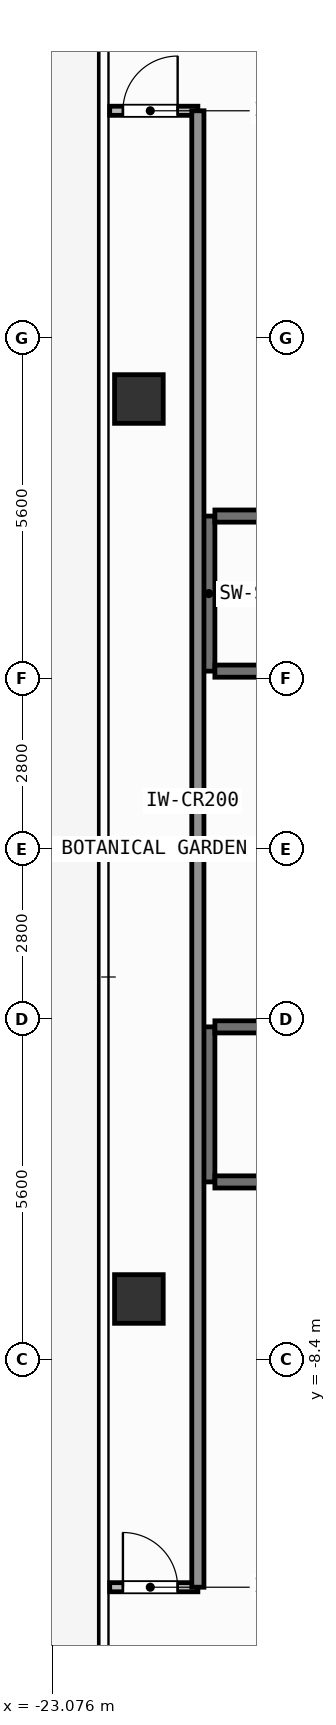
"""IFC4 building model, lengths in metres.
Left out: names, types, materials, properties, quantities, classifications, styles, units other than length and angle.
Written with IfcOpenShell. Run it as: python <this file> out.ifc"""

import sys

from ifc_helpers import new_model, si_unit, direction, frame, frame_2d, origin, origin_2d, place, context, subcontext, project, spatial, rectangle, hollow_rectangle, extrude, element, fill, save


model = new_model("IFC4")
c1 = context("Model", 3, precision=1e-05, world=origin(), true_north=direction((0.0, 1.0)))
c2 = subcontext(c1, "Body", "Model", "MODEL_VIEW")
j1 = project(units=[si_unit("LENGTHUNIT", "METRE"), si_unit("PLANEANGLEUNIT", "RADIAN")], contexts=[c1])
p1 = place(None, origin())
s1 = spatial("IfcSite", under=j1, at=p1, CompositionType="ELEMENT")
p2 = place(p1, origin())
s2 = spatial("IfcBuilding", under=s1, at=p2, CompositionType="ELEMENT")
p3 = place(p2, frame((0.0, 0.0, 26.4)))
s3 = spatial("IfcBuildingStorey", under=s2, at=p3, CompositionType="ELEMENT", Elevation=26.4)
for number, where, z_axis, x_axis in (
    (1, (-21.65, -7.4, 0.0), (0.0, 0.0, 1.0), (1.0, 0.0, 0.0)),
    (2, (-21.65, 7.4, 0.0), (0.0, 0.0, 1.0), (1.0, 0.0, 0.0)),
):
    element("IfcColumn", number, at=place(p3, frame(where, z_axis=z_axis, x_axis=x_axis)), inside=s3, PredefinedType="COLUMN", context=c2, shape_type="SweptSolid", body=[
        extrude(hollow_rectangle(XDim=0.8, YDim=0.8, WallThickness=0.036, at=origin_2d()), origin(), (0.0, 0.0, 1.0), 4.2),
    ])
p4 = place(p3, frame((-20.5, -5.475, 0.0), z_axis=(0.0, 0.0, 1.0), x_axis=(0.0, 1.0, 0.0)))
e3 = element("IfcWall", 3, at=p4, inside=s3, PredefinedType="SHEAR", context=c2, shape_type="SweptSolid", body=[
    extrude(rectangle(XDim=2.55, YDim=0.2, at=frame_2d((1.275, 0.0))), origin(), (0.0, 0.0, 1.0), 3.98),
])
for number, where, z_axis, x_axis in (
    (4, (-20.4, -5.475, 0.0), (0.0, 0.0, 1.0), (1.0, 0.0, 0.0)),
    (5, (-20.4, -2.925, 0.0), (0.0, 0.0, 1.0), (1.0, 0.0, 0.0)),
):
    element("IfcWall", number, at=place(p3, frame(where, z_axis=z_axis, x_axis=x_axis)), inside=s3, PredefinedType="SHEAR", context=c2, shape_type="SweptSolid", body=[
        extrude(rectangle(XDim=2.4, YDim=0.2, at=frame_2d((1.2, 0.0))), origin(), (0.0, 0.0, 1.0), 3.98),
    ])
p5 = place(p3, frame((-20.5, 2.925, 0.0), z_axis=(0.0, 0.0, 1.0), x_axis=(0.0, 1.0, 0.0)))
e6 = element("IfcWall", 6, at=p5, inside=s3, PredefinedType="SHEAR", context=c2, shape_type="SweptSolid", body=[
    extrude(rectangle(XDim=2.55, YDim=0.2, at=frame_2d((1.275, 0.0))), origin(), (0.0, 0.0, 1.0), 3.98),
])
for number, where, z_axis, x_axis in (
    (7, (-20.4, 2.925, 0.0), (0.0, 0.0, 1.0), (1.0, 0.0, 0.0)),
    (8, (-20.4, 5.475, 0.0), (0.0, 0.0, 1.0), (1.0, 0.0, 0.0)),
):
    element("IfcWall", number, at=place(p3, frame(where, z_axis=z_axis, x_axis=x_axis)), inside=s3, PredefinedType="SHEAR", context=c2, shape_type="SweptSolid", body=[
        extrude(rectangle(XDim=2.4, YDim=0.2, at=frame_2d((1.2, 0.0))), origin(), (0.0, 0.0, 1.0), 3.98),
    ])
p6 = place(p3, frame((-22.13, -12.14, 0.0), z_axis=(0.0, 0.0, 1.0), x_axis=(1.0, 0.0, 0.0)))
e9 = element("IfcWall", 9, at=p6, inside=s3, PredefinedType="PARTITIONING", context=c2, shape_type="SweptSolid", body=[
    extrude(rectangle(XDim=1.45, YDim=0.15, at=frame_2d((0.725, 0.0))), origin(), (0.0, 0.0, 1.0), 3.98),
])
p7 = place(p6, frame((0.218, 0.0, 0.0)))
e10 = element("IfcOpeningElement", 10, at=p7, cuts=e9, PredefinedType="OPENING", context=c2, shape_type="SweptSolid", body=[
    extrude(rectangle(XDim=0.9, YDim=2.1, at=frame_2d((0.45, 1.05))), frame((0.0, 0.085, 0.0), z_axis=(0.0, -1.0, 0.0), x_axis=(1.0, 0.0, 0.0)), (0.0, 0.0, 1.0), 0.17),
])
p8 = place(p3, frame((-22.13, 12.14, 0.0), z_axis=(0.0, 0.0, 1.0), x_axis=(1.0, 0.0, 0.0)))
e11 = element("IfcWall", 11, at=p8, inside=s3, PredefinedType="PARTITIONING", context=c2, shape_type="SweptSolid", body=[
    extrude(rectangle(XDim=1.45, YDim=0.15, at=frame_2d((0.725, 0.0))), origin(), (0.0, 0.0, 1.0), 3.98),
])
p9 = place(p8, frame((0.218, 0.0, 0.0)))
e12 = element("IfcOpeningElement", 12, at=p9, cuts=e11, PredefinedType="OPENING", context=c2, shape_type="SweptSolid", body=[
    extrude(rectangle(XDim=0.9, YDim=2.1, at=frame_2d((0.45, 1.05))), frame((0.0, 0.085, 0.0), z_axis=(0.0, -1.0, 0.0), x_axis=(1.0, 0.0, 0.0)), (0.0, 0.0, 1.0), 0.17),
])
p10 = place(p3, frame((-20.68, -12.14, 0.0), z_axis=(0.0, 0.0, 1.0), x_axis=(0.0, 1.0, 0.0)))
e13 = element("IfcWall", 13, at=p10, inside=s3, PredefinedType="SOLIDWALL", context=c2, shape_type="SweptSolid", body=[
    extrude(rectangle(XDim=24.28, YDim=0.2, at=frame_2d((12.14, 0.0))), origin(), (0.0, 0.0, 1.0), 3.98),
])
p11 = place(p7, origin())
e14 = element("IfcDoor", 14, at=p11, inside=s3, OperationType="SINGLE_SWING_LEFT", PredefinedType="DOOR", context=c2, shape_type="SweptSolid", body=[
    extrude(rectangle(XDim=0.9, YDim=2.1, at=frame_2d((0.45, 1.05))), frame((0.0, 0.025, 0.0), z_axis=(0.0, -1.0, 0.0), x_axis=(1.0, 0.0, 0.0)), (0.0, 0.0, 1.0), 0.05),
])
fill(e10, e14)
p12 = place(p9, origin())
e15 = element("IfcDoor", 15, at=p12, inside=s3, OperationType="SINGLE_SWING_RIGHT", PredefinedType="DOOR", context=c2, shape_type="SweptSolid", body=[
    extrude(rectangle(XDim=0.9, YDim=2.1, at=frame_2d((0.45, 1.05))), frame((0.0, 0.025, 0.0), z_axis=(0.0, -1.0, 0.0), x_axis=(1.0, 0.0, 0.0)), (0.0, 0.0, 1.0), 0.05),
])
fill(e12, e15)
save(model, sys.argv[1])
